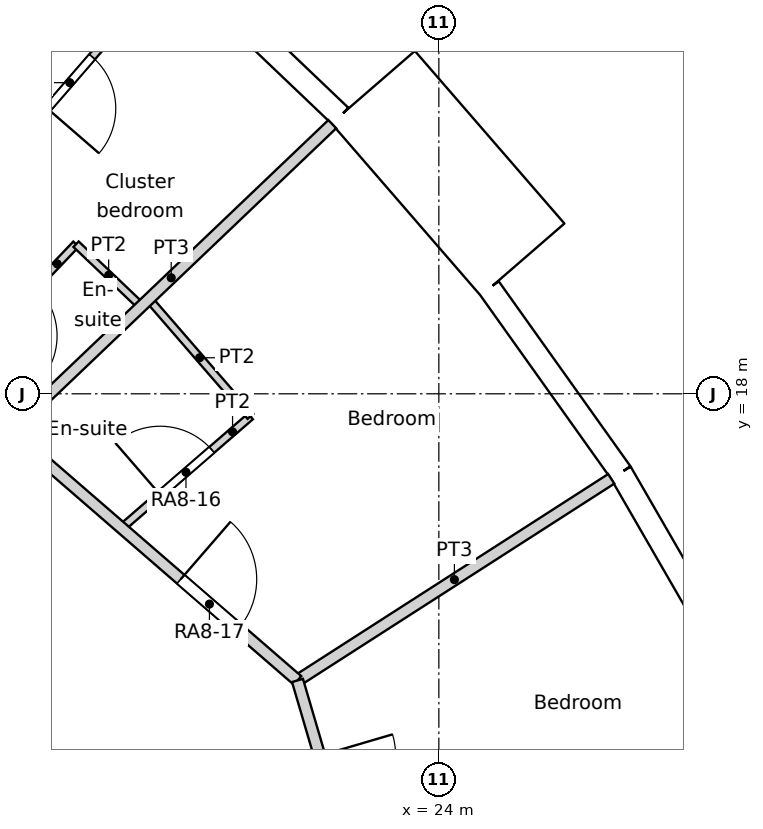
"""IFC4 building model, lengths in metres.
Left out: names, types, materials, properties, quantities, classifications, styles, units other than length and angle.
Written with IfcOpenShell. Run it as: python <this file> out.ifc"""

import sys

from ifc_helpers import new_model, si_unit, direction, frame, frame_2d, origin, origin_2d, place, context, subcontext, project, spatial, rectangle, circle, extrude, element, fill, save


model = new_model("IFC4")
c1 = context("Model", 3, precision=1e-05, world=origin(), true_north=direction((0.0, 1.0)))
c2 = subcontext(c1, "Body", "Model", "MODEL_VIEW")
j1 = project(units=[si_unit("LENGTHUNIT", "METRE"), si_unit("PLANEANGLEUNIT", "RADIAN")], contexts=[c1])
p1 = place(None, origin())
s1 = spatial("IfcSite", under=j1, at=p1, CompositionType="ELEMENT")
p2 = place(p1, origin())
s2 = spatial("IfcBuilding", under=s1, at=p2, CompositionType="ELEMENT")
p3 = place(p2, frame((0.0, 0.0, 103.8)))
s3 = spatial("IfcBuildingStorey", under=s2, at=p3, CompositionType="ELEMENT", Elevation=103.8)
for number, where, z_axis, x_axis in (
    (1, (25.469, 16.368, 0.0), (0.0, 0.0, 1.0), (1.0, 0.0, 0.0)),
    (2, (21.911, 20.892, 0.0), (0.0, 0.0, 1.0), (1.0, 0.0, 0.0)),
):
    element("IfcColumn", number, at=place(p3, frame(where, z_axis=z_axis, x_axis=x_axis)), inside=s3, PredefinedType="COLUMN", context=c2, shape_type="SweptSolid", body=[
        extrude(circle(Radius=0.6, at=origin_2d()), origin(), (0.0, 0.0, 1.0), 3.6),
    ])
p4 = place(p3, frame((18.805, 15.779, 0.0), z_axis=(0.0, 0.0, 1.0), x_axis=(1.0, 0.0, 0.0)))
e3 = element("IfcColumn", 3, at=p4, inside=s3, PredefinedType="COLUMN", context=c2, shape_type="SweptSolid", body=[
    extrude(circle(Radius=0.65, at=origin_2d()), origin(), (0.0, 0.0, 1.0), 3.6),
])
p5 = place(p3, frame((27.884, 14.382, 0.0), z_axis=(0.0, 0.0, 1.0), x_axis=(-0.500025049464, 0.866010940986, 0.0)))
e4 = element("IfcWall", 4, at=p5, inside=s3, PredefinedType="SOLIDWALL", context=c2, shape_type="SweptSolid", body=[
    extrude(rectangle(XDim=2.98, YDim=0.3, at=frame_2d((1.49, 0.0))), origin(), (0.0, 0.0, 1.0), 3.15),
])
p6 = place(p5, frame((1.49, 0.0, 1.55)))
e5 = element("IfcOpeningElement", 5, at=p6, cuts=e4, PredefinedType="OPENING", context=c2, shape_type="SweptSolid", body=[
    extrude(circle(Radius=0.9, at=origin_2d()), frame((0.0, 0.16, 0.0), z_axis=(0.0, -1.0, 0.0), x_axis=(1.0, 0.0, 0.0)), (0.0, 0.0, 1.0), 0.32),
])
p7 = place(p3, frame((26.394, 16.962, 0.0), z_axis=(0.0, 0.0, 1.0), x_axis=(-0.580059407678, 0.81457417315, 0.0)))
e6 = element("IfcWall", 6, at=p7, inside=s3, PredefinedType="SOLIDWALL", context=c2, shape_type="SweptSolid", body=[
    extrude(rectangle(XDim=2.979, YDim=0.3, at=frame_2d((1.49, 0.0))), origin(), (0.0, 0.0, 1.0), 3.15),
])
p8 = place(p7, frame((1.49, 0.0, 1.55)))
e7 = element("IfcOpeningElement", 7, at=p8, cuts=e6, PredefinedType="OPENING", context=c2, shape_type="SweptSolid", body=[
    extrude(circle(Radius=0.9, at=origin_2d()), frame((0.0, 0.16, 0.0), z_axis=(0.0, -1.0, 0.0), x_axis=(1.0, 0.0, 0.0)), (0.0, 0.0, 1.0), 0.32),
])
p9 = place(p3, frame((25.101, 19.766, -0.45), z_axis=(0.0, 0.0, 1.0), x_axis=(-0.654890259022, 0.75572398972, 0.0)))
e8 = element("IfcWall", 8, at=p9, inside=s3, PredefinedType="ELEMENTEDWALL", context=c2, shape_type="SweptSolid", body=[
    extrude(rectangle(XDim=3.0, YDim=1.45, at=frame_2d((1.5, 0.0))), origin(), (0.0, 0.0, 1.0), 3.6),
])
p10 = place(p9, frame((1.5, 0.0, 2.0)))
e9 = element("IfcOpeningElement", 9, at=p10, cuts=e8, PredefinedType="OPENING", context=c2, shape_type="SweptSolid", body=[
    extrude(circle(Radius=0.9, at=origin_2d()), frame((0.0, 0.735, 0.0), z_axis=(0.0, -1.0, 0.0), x_axis=(1.0, 0.0, 0.0)), (0.0, 0.0, 1.0), 1.47),
])
p11 = place(p3, frame((22.702, 21.655, 0.0), z_axis=(0.0, 0.0, 1.0), x_axis=(-0.723744206617, 0.690068346896, 0.0)))
e10 = element("IfcWall", 10, at=p11, inside=s3, PredefinedType="SOLIDWALL", context=c2, shape_type="SweptSolid", body=[
    extrude(rectangle(XDim=2.98, YDim=0.3, at=frame_2d((1.49, 0.0))), origin(), (0.0, 0.0, 1.0), 3.15),
])
p12 = place(p11, frame((1.49, 0.0, 1.55)))
e11 = element("IfcOpeningElement", 11, at=p12, cuts=e10, PredefinedType="OPENING", context=c2, shape_type="SweptSolid", body=[
    extrude(circle(Radius=0.9, at=origin_2d()), frame((0.0, 0.16, 0.0), z_axis=(0.0, -1.0, 0.0), x_axis=(1.0, 0.0, 0.0)), (0.0, 0.0, 1.0), 0.32),
])
p13 = place(p3, frame((22.14, 14.229, 0.0), z_axis=(0.0, 0.0, 1.0), x_axis=(0.281780364869, -0.959478934617, 0.0)))
e12 = element("IfcWall", 12, at=p13, inside=s3, PredefinedType="PARTITIONING", context=c2, shape_type="SweptSolid", body=[
    extrude(rectangle(XDim=14.83, YDim=0.15, at=frame_2d((7.415, 0.0))), origin(), (0.0, 0.0, 1.0), 3.15),
])
p14 = place(p13, frame((10.816, 0.0, 0.0)))
e13 = element("IfcOpeningElement", 13, at=p14, cuts=e12, PredefinedType="OPENING", context=c2, shape_type="SweptSolid", body=[
    extrude(rectangle(XDim=1.0, YDim=2.1, at=frame_2d((0.5, 1.05))), frame((0.0, 0.075, 0.0), z_axis=(0.0, -1.0, 0.0), x_axis=(1.0, 0.0, 0.0)), (0.0, 0.0, 1.0), 0.15),
])
p15 = place(p13, frame((5.953, 0.0, 0.0)))
e14 = element("IfcOpeningElement", 14, at=p15, cuts=e12, PredefinedType="OPENING", context=c2, shape_type="SweptSolid", body=[
    extrude(rectangle(XDim=1.0, YDim=2.1, at=frame_2d((0.5, 1.05))), frame((0.0, 0.075, 0.0), z_axis=(0.0, -1.0, 0.0), x_axis=(1.0, 0.0, 0.0)), (0.0, 0.0, 1.0), 0.15),
])
p16 = place(p13, frame((1.033, 0.0, 0.0)))
e15 = element("IfcOpeningElement", 15, at=p16, cuts=e12, PredefinedType="OPENING", context=c2, shape_type="SweptSolid", body=[
    extrude(rectangle(XDim=1.0, YDim=2.1, at=frame_2d((0.5, 1.05))), frame((0.0, 0.075, 0.0), z_axis=(0.0, -1.0, 0.0), x_axis=(1.0, 0.0, 0.0)), (0.0, 0.0, 1.0), 0.15),
])
p17 = place(p3, frame((10.932, 23.939, 0.0), z_axis=(0.0, 0.0, 1.0), x_axis=(0.755838982892, -0.654757536757, 0.0)))
e16 = element("IfcWall", 16, at=p17, inside=s3, PredefinedType="PARTITIONING", context=c2, shape_type="SweptSolid", body=[
    extrude(rectangle(XDim=14.83, YDim=0.15, at=frame_2d((7.415, 0.0))), origin(), (0.0, 0.0, 1.0), 3.15),
])
p18 = place(p17, frame((12.796, 0.0, 0.0)))
e17 = element("IfcOpeningElement", 17, at=p18, cuts=e16, PredefinedType="OPENING", context=c2, shape_type="SweptSolid", body=[
    extrude(rectangle(XDim=1.0, YDim=2.1, at=frame_2d((0.5, 1.05))), frame((0.0, 0.075, 0.0), z_axis=(0.0, -1.0, 0.0), x_axis=(1.0, 0.0, 0.0)), (0.0, 0.0, 1.0), 0.15),
])
p19 = place(p17, frame((3.472, 0.0, 0.0)))
e18 = element("IfcOpeningElement", 18, at=p19, cuts=e16, PredefinedType="OPENING", context=c2, shape_type="SweptSolid", body=[
    extrude(rectangle(XDim=1.1, YDim=2.1, at=frame_2d((0.55, 1.05))), frame((0.0, 0.075, 0.0), z_axis=(0.0, -1.0, 0.0), x_axis=(1.0, 0.0, 0.0)), (0.0, 0.0, 1.0), 0.15),
])
p20 = place(p3, frame((22.141, 14.229, 0.0), z_axis=(0.0, 0.0, 1.0), x_axis=(0.841265781699, 0.540621757371, 0.0)))
e19 = element("IfcWall", 19, at=p20, inside=s3, PredefinedType="PARTITIONING", context=c2, shape_type="SweptSolid", body=[
    extrude(rectangle(XDim=4.906, YDim=0.15, at=frame_2d((2.453, 0.0))), origin(), (0.0, 0.0, 1.0), 3.15),
])
p21 = place(p3, frame((19.826, 16.234, 0.0), z_axis=(0.0, 0.0, 1.0), x_axis=(0.755703447798, 0.654913963042, 0.0)))
e20 = element("IfcWall", 20, at=p21, inside=s3, PredefinedType="PARTITIONING", context=c2, shape_type="SweptSolid", body=[
    extrude(rectangle(XDim=2.243, YDim=0.1, at=frame_2d((1.122, 0.0))), origin(), (0.0, 0.0, 1.0), 3.15),
])
p22 = place(p21, frame((0.671, 0.0, 0.0)))
e21 = element("IfcOpeningElement", 21, at=p22, cuts=e20, PredefinedType="OPENING", context=c2, shape_type="SweptSolid", body=[
    extrude(rectangle(XDim=0.9, YDim=2.04, at=frame_2d((0.45, 1.02))), frame((0.0, 0.05, 0.0), z_axis=(0.0, -1.0, 0.0), x_axis=(1.0, 0.0, 0.0)), (0.0, 0.0, 1.0), 0.1),
])
p23 = place(p3, frame((20.184, 19.245, 0.0), z_axis=(0.0, 0.0, 1.0), x_axis=(0.655017058368, -0.755614090159, 0.0)))
e22 = element("IfcWall", 22, at=p23, inside=s3, PredefinedType="PARTITIONING", context=c2, shape_type="SweptSolid", body=[
    extrude(rectangle(XDim=2.041, YDim=0.1, at=frame_2d((1.021, 0.0))), origin(), (0.0, 0.0, 1.0), 3.15),
])
p24 = place(p3, frame((18.36, 17.505, 0.0), z_axis=(0.0, 0.0, 1.0), x_axis=(0.723686703731, 0.690128650937, 0.0)))
e23 = element("IfcWall", 23, at=p24, inside=s3, PredefinedType="PARTITIONING", context=c2, shape_type="SweptSolid", body=[
    extrude(rectangle(XDim=5.856, YDim=0.15, at=frame_2d((2.928, 0.0))), origin(), (0.0, 0.0, 1.0), 3.15),
])
p25 = place(p3, frame((18.0, 20.773, 0.0), z_axis=(0.0, 0.0, 1.0), x_axis=(0.654885780154, 0.755727870964, 0.0)))
e24 = element("IfcWall", 24, at=p25, inside=s3, PredefinedType="PARTITIONING", context=c2, shape_type="SweptSolid", body=[
    extrude(rectangle(XDim=3.738, YDim=0.1, at=frame_2d((1.869, 0.0))), origin(), (0.0, 0.0, 1.0), 3.15),
])
p26 = place(p25, frame((1.297, 0.0, 0.0)))
e25 = element("IfcOpeningElement", 25, at=p26, cuts=e24, PredefinedType="OPENING", context=c2, shape_type="SweptSolid", body=[
    extrude(rectangle(XDim=0.9, YDim=2.1, at=frame_2d((0.45, 1.05))), frame((0.0, 0.05, 0.0), z_axis=(0.0, -1.0, 0.0), x_axis=(1.0, 0.0, 0.0)), (0.0, 0.0, 1.0), 0.1),
])
p27 = place(p3, frame((19.227, 19.968, 0.0), z_axis=(0.0, 0.0, 1.0), x_axis=(0.724103627225, -0.68969118962, 0.0)))
e26 = element("IfcWall", 26, at=p27, inside=s3, PredefinedType="PARTITIONING", context=c2, shape_type="SweptSolid", body=[
    extrude(rectangle(XDim=1.185, YDim=0.1, at=frame_2d((0.592, 0.0))), origin(), (0.0, 0.0, 1.0), 3.15),
])
p28 = place(p3, frame((17.549, 18.208, 0.0), z_axis=(0.0, 0.0, 1.0), x_axis=(0.690038643162, 0.723772527071, 0.0)))
e27 = element("IfcWall", 27, at=p28, inside=s3, PredefinedType="PARTITIONING", context=c2, shape_type="SweptSolid", body=[
    extrude(rectangle(XDim=2.432, YDim=0.1, at=frame_2d((1.216, 0.0))), origin(), (0.0, 0.0, 1.0), 3.15),
])
p29 = place(p28, frame((0.766, 0.0, 0.0)))
e28 = element("IfcOpeningElement", 28, at=p29, cuts=e27, PredefinedType="OPENING", context=c2, shape_type="SweptSolid", body=[
    extrude(rectangle(XDim=0.9, YDim=2.04, at=frame_2d((0.45, 1.02))), frame((0.0, 0.05, 0.0), z_axis=(0.0, -1.0, 0.0), x_axis=(1.0, 0.0, 0.0)), (0.0, 0.0, 1.0), 0.1),
])
p30 = place(p6, origin())
e29 = element("IfcWindow", 29, at=p30, inside=s3, PartitioningType="SINGLE_PANEL", PredefinedType="WINDOW", context=c2, shape_type="SweptSolid", body=[
    extrude(circle(Radius=0.9, at=origin_2d()), frame((0.0, 0.12, 0.0), z_axis=(0.0, -1.0, 0.0), x_axis=(1.0, 0.0, 0.0)), (0.0, 0.0, 1.0), 0.1),
])
fill(e5, e29)
p31 = place(p8, origin())
e30 = element("IfcWindow", 30, at=p31, inside=s3, PartitioningType="SINGLE_PANEL", PredefinedType="WINDOW", context=c2, shape_type="SweptSolid", body=[
    extrude(circle(Radius=0.9, at=origin_2d()), frame((0.0, 0.12, 0.0), z_axis=(0.0, -1.0, 0.0), x_axis=(1.0, 0.0, 0.0)), (0.0, 0.0, 1.0), 0.1),
])
fill(e7, e30)
p32 = place(p10, origin())
e31 = element("IfcWindow", 31, at=p32, inside=s3, PartitioningType="SINGLE_PANEL", PredefinedType="WINDOW", context=c2, shape_type="SweptSolid", body=[
    extrude(circle(Radius=0.9, at=origin_2d()), frame((0.0, 0.695, 0.0), z_axis=(0.0, -1.0, 0.0), x_axis=(1.0, 0.0, 0.0)), (0.0, 0.0, 1.0), 0.1),
])
fill(e9, e31)
p33 = place(p12, origin())
e32 = element("IfcWindow", 32, at=p33, inside=s3, PartitioningType="SINGLE_PANEL", PredefinedType="WINDOW", context=c2, shape_type="SweptSolid", body=[
    extrude(circle(Radius=0.9, at=origin_2d()), frame((0.0, 0.12, 0.0), z_axis=(0.0, -1.0, 0.0), x_axis=(1.0, 0.0, 0.0)), (0.0, 0.0, 1.0), 0.1),
])
fill(e11, e32)
p34 = place(p22, origin())
e33 = element("IfcDoor", 33, at=p34, inside=s3, OperationType="SINGLE_SWING_LEFT", PredefinedType="DOOR", context=c2, shape_type="SweptSolid", body=[
    extrude(rectangle(XDim=0.9, YDim=2.04, at=frame_2d((0.45, 1.02))), frame((0.0, 0.025, 0.0), z_axis=(0.0, -1.0, 0.0), x_axis=(1.0, 0.0, 0.0)), (0.0, 0.0, 1.0), 0.05),
])
fill(e21, e33)
p35 = place(p18, origin())
e34 = element("IfcDoor", 34, at=p35, inside=s3, OperationType="SINGLE_SWING_LEFT", PredefinedType="DOOR", context=c2, shape_type="SweptSolid", body=[
    extrude(rectangle(XDim=1.0, YDim=2.1, at=frame_2d((0.5, 1.05))), frame((0.0, 0.025, 0.0), z_axis=(0.0, -1.0, 0.0), x_axis=(1.0, 0.0, 0.0)), (0.0, 0.0, 1.0), 0.05),
])
fill(e17, e34)
p36 = place(p26, origin())
e35 = element("IfcDoor", 35, at=p36, inside=s3, OperationType="SINGLE_SWING_RIGHT", PredefinedType="DOOR", context=c2, shape_type="SweptSolid", body=[
    extrude(rectangle(XDim=0.9, YDim=2.1, at=frame_2d((0.45, 1.05))), frame((0.0, 0.025, 0.0), z_axis=(0.0, -1.0, 0.0), x_axis=(1.0, 0.0, 0.0)), (0.0, 0.0, 1.0), 0.05),
])
fill(e25, e35)
save(model, sys.argv[1])
